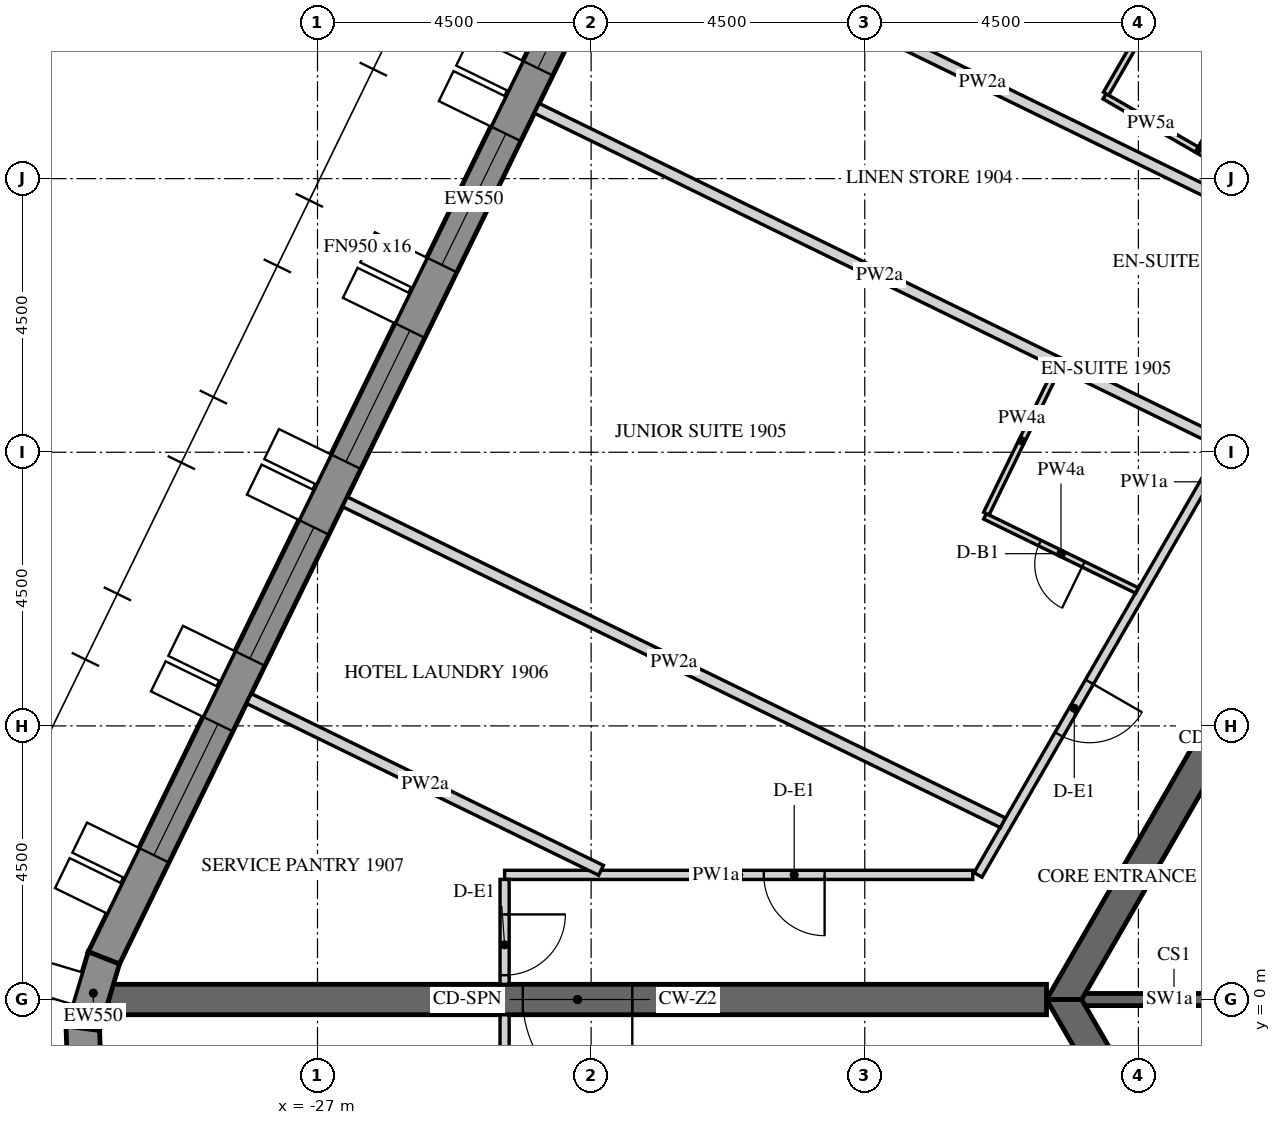
"""IFC4 building model, lengths in metres.
Left out: names, types, materials, properties, quantities, classifications, styles, units other than length and angle.
Written with IfcOpenShell. Run it as: python <this file> out.ifc"""

import sys

from ifc_helpers import new_model, si_unit, direction, frame, frame_2d, origin, place, context, subcontext, project, spatial, polyline, rectangle, outline, extrude, element, fill, save


model = new_model("IFC4")
c1 = context("Model", 3, precision=1e-05, world=origin(), true_north=direction((0.0, 1.0)))
c2 = subcontext(c1, "Body", "Model", "MODEL_VIEW")
j1 = project(units=[si_unit("LENGTHUNIT", "METRE"), si_unit("PLANEANGLEUNIT", "RADIAN")], contexts=[c1])
p1 = place(None, origin())
s1 = spatial("IfcSite", under=j1, at=p1, CompositionType="ELEMENT")
p2 = place(p1, origin())
s2 = spatial("IfcBuilding", under=s1, at=p2, CompositionType="ELEMENT")
p3 = place(p2, frame((0.0, 0.0, 238.5)))
s3 = spatial("IfcBuildingStorey", under=s2, at=p3, CompositionType="ELEMENT", Elevation=238.5)
p4 = place(p3, frame((-18.345, 25.633, -0.15), z_axis=(0.0, 0.0, 1.0), x_axis=(-0.43837181828, -0.898793718791, 0.0)))
e1 = element("IfcWall", 1, at=p4, inside=s3, PredefinedType="SOLIDWALL", context=c2, shape_type="SweptSolid", body=[
    extrude(outline(polyline([(-0.026, -0.275), (27.78, -0.275), (27.735, 0.275), (0.026, 0.275), (-0.026, -0.275)])), origin(), (0.0, 0.0, 1.0), 3.9),
])
p5 = place(p4, frame((1.879, 0.0, 1.05)))
e2 = element("IfcOpeningElement", 2, at=p5, cuts=e1, PredefinedType="OPENING", context=c2, shape_type="SweptSolid", body=[
    extrude(rectangle(XDim=2.4, YDim=2.4, at=frame_2d((1.2, 1.2))), frame((0.0, 0.285, 0.0), z_axis=(0.0, -1.0, 0.0), x_axis=(1.0, 0.0, 0.0)), (0.0, 0.0, 1.0), 0.57),
])
p6 = place(p4, frame((5.479, 0.0, 1.05)))
e3 = element("IfcOpeningElement", 3, at=p6, cuts=e1, PredefinedType="OPENING", context=c2, shape_type="SweptSolid", body=[
    extrude(rectangle(XDim=2.4, YDim=2.4, at=frame_2d((1.2, 1.2))), frame((0.0, 0.285, 0.0), z_axis=(0.0, -1.0, 0.0), x_axis=(1.0, 0.0, 0.0)), (0.0, 0.0, 1.0), 0.57),
])
p7 = place(p4, frame((9.079, 0.0, 1.05)))
e4 = element("IfcOpeningElement", 4, at=p7, cuts=e1, PredefinedType="OPENING", context=c2, shape_type="SweptSolid", body=[
    extrude(rectangle(XDim=2.4, YDim=2.4, at=frame_2d((1.2, 1.2))), frame((0.0, 0.285, 0.0), z_axis=(0.0, -1.0, 0.0), x_axis=(1.0, 0.0, 0.0)), (0.0, 0.0, 1.0), 0.57),
])
p8 = place(p4, frame((12.679, 0.0, 1.05)))
e5 = element("IfcOpeningElement", 5, at=p8, cuts=e1, PredefinedType="OPENING", context=c2, shape_type="SweptSolid", body=[
    extrude(rectangle(XDim=2.4, YDim=2.4, at=frame_2d((1.2, 1.2))), frame((0.0, 0.285, 0.0), z_axis=(0.0, -1.0, 0.0), x_axis=(1.0, 0.0, 0.0)), (0.0, 0.0, 1.0), 0.57),
])
p9 = place(p4, frame((16.279, 0.0, 1.05)))
e6 = element("IfcOpeningElement", 6, at=p9, cuts=e1, PredefinedType="OPENING", context=c2, shape_type="SweptSolid", body=[
    extrude(rectangle(XDim=2.4, YDim=2.4, at=frame_2d((1.2, 1.2))), frame((0.0, 0.285, 0.0), z_axis=(0.0, -1.0, 0.0), x_axis=(1.0, 0.0, 0.0)), (0.0, 0.0, 1.0), 0.57),
])
p10 = place(p4, frame((19.879, 0.0, 1.05)))
e7 = element("IfcOpeningElement", 7, at=p10, cuts=e1, PredefinedType="OPENING", context=c2, shape_type="SweptSolid", body=[
    extrude(rectangle(XDim=2.4, YDim=2.4, at=frame_2d((1.2, 1.2))), frame((0.0, 0.285, 0.0), z_axis=(0.0, -1.0, 0.0), x_axis=(1.0, 0.0, 0.0)), (0.0, 0.0, 1.0), 0.57),
])
p11 = place(p4, frame((23.479, 0.0, 1.05)))
e8 = element("IfcOpeningElement", 8, at=p11, cuts=e1, PredefinedType="OPENING", context=c2, shape_type="SweptSolid", body=[
    extrude(rectangle(XDim=2.4, YDim=2.4, at=frame_2d((1.2, 1.2))), frame((0.0, 0.285, 0.0), z_axis=(0.0, -1.0, 0.0), x_axis=(1.0, 0.0, 0.0)), (0.0, 0.0, 1.0), 0.57),
])
p12 = place(p3, frame((-30.513, 0.684, -0.15), z_axis=(0.0, 0.0, 1.0), x_axis=(-0.286736058109, -0.958009620505, 0.0)))
e9 = element("IfcWall", 9, at=p12, inside=s3, PredefinedType="SOLIDWALL", context=c2, shape_type="SweptSolid", body=[
    extrude(outline(polyline([(-0.022, -0.275), (1.253, -0.275), (1.163, 0.275), (0.022, 0.275), (-0.022, -0.275)])), origin(), (0.0, 0.0, 1.0), 3.9),
])
p13 = place(p3, frame((-30.86, -0.473, -0.15), z_axis=(0.0, 0.0, 1.0), x_axis=(0.03495638276, -0.999388838893, 0.0)))
e10 = element("IfcWall", 10, at=p13, inside=s3, PredefinedType="SOLIDWALL", context=c2, shape_type="SweptSolid", body=[
    extrude(outline(polyline([(-0.045, -0.275), (1.253, -0.275), (1.163, 0.275), (0.045, 0.275), (-0.045, -0.275)])), origin(), (0.0, 0.0, 1.0), 3.9),
])
p14 = place(p3, frame((-7.361, 12.75, -0.15), z_axis=(0.0, 0.0, 1.0), x_axis=(-0.50000571537, -0.866022103989, 0.0)))
e11 = element("IfcWall", 11, at=p14, inside=s3, PredefinedType="SHEAR", context=c2, shape_type="SweptSolid", body=[
    extrude(outline(polyline([(-0.144, -0.25), (14.867, -0.25), (14.578, 0.25), (0.144, 0.25), (-0.144, -0.25)])), origin(), (0.0, 0.0, 1.0), 3.9),
])
p15 = place(p14, frame((6.49, 0.0, 0.15)))
e12 = element("IfcOpeningElement", 12, at=p15, cuts=e11, PredefinedType="OPENING", context=c2, shape_type="SweptSolid", body=[
    extrude(rectangle(XDim=1.8, YDim=2.4, at=frame_2d((0.9, 1.2))), frame((0.0, 0.26, 0.0), z_axis=(0.0, -1.0, 0.0), x_axis=(1.0, 0.0, 0.0)), (0.0, 0.0, 1.0), 0.52),
])
p16 = place(p3, frame((-14.722, 0.0, -0.15), z_axis=(0.0, 0.0, 1.0), x_axis=(0.50000571537, -0.866022103989, 0.0)))
e13 = element("IfcWall", 13, at=p16, inside=s3, PredefinedType="SHEAR", context=c2, shape_type="SweptSolid", body=[
    extrude(outline(polyline([(-0.144, -0.25), (14.867, -0.25), (14.578, 0.25), (0.144, 0.25), (-0.144, -0.25)])), origin(), (0.0, 0.0, 1.0), 3.9),
])
p17 = place(p16, frame((6.432, 0.0, 0.15)))
e14 = element("IfcOpeningElement", 14, at=p17, cuts=e13, PredefinedType="OPENING", context=c2, shape_type="SweptSolid", body=[
    extrude(rectangle(XDim=1.8, YDim=2.4, at=frame_2d((0.9, 1.2))), frame((0.0, 0.26, 0.0), z_axis=(0.0, -1.0, 0.0), x_axis=(1.0, 0.0, 0.0)), (0.0, 0.0, 1.0), 0.52),
])
p18 = place(p3, frame((-15.011, 0.0, -0.15), z_axis=(0.0, 0.0, 1.0), x_axis=(-1.0, 0.0, 0.0)))
e15 = element("IfcWall", 15, at=p18, inside=s3, PredefinedType="SHEAR", context=c2, shape_type="SweptSolid", body=[
    extrude(rectangle(XDim=15.424, YDim=0.5, at=frame_2d((7.712, 0.0))), origin(), (0.0, 0.0, 1.0), 3.9),
])
p19 = place(p18, frame((6.812, 0.0, 0.15)))
e16 = element("IfcOpeningElement", 16, at=p19, cuts=e15, PredefinedType="OPENING", context=c2, shape_type="SweptSolid", body=[
    extrude(rectangle(XDim=1.8, YDim=2.4, at=frame_2d((0.9, 1.2))), frame((0.0, 0.26, 0.0), z_axis=(0.0, -1.0, 0.0), x_axis=(1.0, 0.0, 0.0)), (0.0, 0.0, 1.0), 0.52),
])
p20 = place(p3, frame((-11.547, 0.0, -0.15), z_axis=(0.0, 0.0, 1.0), x_axis=(-1.0, 0.0, 0.0)))
e17 = element("IfcWall", 17, at=p20, inside=s3, PredefinedType="SHEAR", context=c2, shape_type="SweptSolid", body=[
    extrude(rectangle(XDim=2.887, YDim=0.2, at=frame_2d((1.443, 0.0))), origin(), (0.0, 0.0, 1.0), 3.9),
])
p21 = place(p3, frame((-8.673, 14.978, 0.0), z_axis=(0.0, 0.0, 1.0), x_axis=(-0.50000700621, -0.86602135871, 0.0)))
e18 = element("IfcWall", 18, at=p21, inside=s3, PredefinedType="PARTITIONING", context=c2, shape_type="SweptSolid", body=[
    extrude(rectangle(XDim=14.928, YDim=0.15, at=frame_2d((7.464, 0.0))), origin(), (0.0, 0.0, 1.0), 2.838),
])
p22 = place(p21, frame((4.454, 0.0, 0.0)))
e19 = element("IfcOpeningElement", 19, at=p22, cuts=e18, PredefinedType="OPENING", context=c2, shape_type="SweptSolid", body=[
    extrude(rectangle(XDim=1.0, YDim=2.1, at=frame_2d((0.5, 1.05))), frame((0.0, 0.085, 0.0), z_axis=(0.0, -1.0, 0.0), x_axis=(1.0, 0.0, 0.0)), (0.0, 0.0, 1.0), 0.17),
])
p23 = place(p21, frame((11.264, 0.0, 0.0)))
e20 = element("IfcOpeningElement", 20, at=p23, cuts=e18, PredefinedType="OPENING", context=c2, shape_type="SweptSolid", body=[
    extrude(rectangle(XDim=1.0, YDim=2.1, at=frame_2d((0.5, 1.05))), frame((0.0, 0.085, 0.0), z_axis=(0.0, -1.0, 0.0), x_axis=(1.0, 0.0, 0.0)), (0.0, 0.0, 1.0), 0.17),
])
p24 = place(p3, frame((-16.224, 2.05, 0.0), z_axis=(0.0, 0.0, 1.0), x_axis=(-1.0, 0.0, 0.0)))
e21 = element("IfcWall", 21, at=p24, inside=s3, PredefinedType="PARTITIONING", context=c2, shape_type="SweptSolid", body=[
    extrude(rectangle(XDim=7.699, YDim=0.15, at=frame_2d((3.85, 0.0))), origin(), (0.0, 0.0, 1.0), 2.838),
])
p25 = place(p24, frame((2.437, 0.0, 0.0)))
e22 = element("IfcOpeningElement", 22, at=p25, cuts=e21, PredefinedType="OPENING", context=c2, shape_type="SweptSolid", body=[
    extrude(rectangle(XDim=1.0, YDim=2.1, at=frame_2d((0.5, 1.05))), frame((0.0, 0.085, 0.0), z_axis=(0.0, -1.0, 0.0), x_axis=(1.0, 0.0, 0.0)), (0.0, 0.0, 1.0), 0.17),
])
p26 = place(p3, frame((-23.923, 1.975, 0.0), z_axis=(0.0, 0.0, 1.0), x_axis=(0.0, -1.0, 0.0)))
e23 = element("IfcWall", 23, at=p26, inside=s3, PredefinedType="PARTITIONING", context=c2, shape_type="SweptSolid", body=[
    extrude(rectangle(XDim=1.725, YDim=0.15, at=frame_2d((0.863, 0.0))), origin(), (0.0, 0.0, 1.0), 2.838),
])
p27 = place(p26, frame((0.575, 0.0, 0.0)))
e24 = element("IfcOpeningElement", 24, at=p27, cuts=e23, PredefinedType="OPENING", context=c2, shape_type="SweptSolid", body=[
    extrude(rectangle(XDim=1.0, YDim=2.1, at=frame_2d((0.5, 1.05))), frame((0.0, 0.085, 0.0), z_axis=(0.0, -1.0, 0.0), x_axis=(1.0, 0.0, 0.0)), (0.0, 0.0, 1.0), 0.17),
])
p28 = place(p3, frame((-23.923, -0.25, 0.0), z_axis=(0.0, 0.0, 1.0), x_axis=(0.0, -1.0, 0.0)))
e25 = element("IfcWall", 25, at=p28, inside=s3, PredefinedType="PARTITIONING", context=c2, shape_type="SweptSolid", body=[
    extrude(rectangle(XDim=1.8, YDim=0.15, at=frame_2d((0.9, 0.0))), origin(), (0.0, 0.0, 1.0), 2.838),
])
p29 = place(p3, frame((-10.138, 12.591, 0.0), z_axis=(0.0, 0.0, 1.0), x_axis=(-0.866051307416, 0.49995513091, 0.0)))
e26 = element("IfcWall", 26, at=p29, inside=s3, PredefinedType="PARTITIONING", context=c2, shape_type="SweptSolid", body=[
    extrude(rectangle(XDim=2.725, YDim=0.1, at=frame_2d((1.362, 0.0))), origin(), (0.0, 0.0, 1.0), 2.838),
])
p30 = place(p3, frame((-12.541, 13.978, 0.0), z_axis=(0.0, 0.0, 1.0), x_axis=(-0.866036909293, 0.499980071345, 0.0)))
e27 = element("IfcWall", 27, at=p30, inside=s3, PredefinedType="PARTITIONING", context=c2, shape_type="SweptSolid", body=[
    extrude(rectangle(XDim=1.75, YDim=0.1, at=frame_2d((0.875, 0.0))), origin(), (0.0, 0.0, 1.0), 2.838),
])
p31 = place(p3, frame((-14.031, 14.896, 0.0), z_axis=(0.0, 0.0, 1.0), x_axis=(0.499996545922, 0.866027397988, 0.0)))
e28 = element("IfcWall", 28, at=p31, inside=s3, PredefinedType="PARTITIONING", context=c2, shape_type="SweptSolid", body=[
    extrude(rectangle(XDim=2.75, YDim=0.1, at=frame_2d((1.375, 0.0))), origin(), (0.0, 0.0, 1.0), 2.838),
])
p32 = place(p3, frame((-21.815, 17.892, 0.0), z_axis=(0.0, 0.0, 1.0), x_axis=(0.898799253997, -0.438360469265, 0.0)))
e29 = element("IfcWall", 29, at=p32, inside=s3, PredefinedType="PARTITIONING", context=c2, shape_type="SweptSolid", body=[
    extrude(rectangle(XDim=12.794, YDim=0.18, at=frame_2d((6.397, 0.0))), origin(), (0.0, 0.0, 1.0), 2.838),
])
p33 = place(p3, frame((-11.123, 16.335, 0.0), z_axis=(0.0, 0.0, 1.0), x_axis=(-0.499980770555, -0.866036505625, 0.0)))
e30 = element("IfcWall", 30, at=p33, inside=s3, PredefinedType="PARTITIONING", context=c2, shape_type="SweptSolid", body=[
    extrude(rectangle(XDim=2.7, YDim=0.1, at=frame_2d((1.35, 0.0))), origin(), (0.0, 0.0, 1.0), 2.838),
])
p34 = place(p3, frame((-23.393, 14.656, 0.0), z_axis=(0.0, 0.0, 1.0), x_axis=(0.898790706576, -0.43837799417, 0.0)))
e31 = element("IfcWall", 31, at=p34, inside=s3, PredefinedType="PARTITIONING", context=c2, shape_type="SweptSolid", body=[
    extrude(rectangle(XDim=12.542, YDim=0.18, at=frame_2d((6.271, 0.0))), origin(), (0.0, 0.0, 1.0), 2.838),
])
p35 = place(p3, frame((-13.523, 6.727, 0.0), z_axis=(0.0, 0.0, 1.0), x_axis=(-0.89880809785, 0.438342335668, 0.0)))
e32 = element("IfcWall", 32, at=p35, inside=s3, PredefinedType="PARTITIONING", context=c2, shape_type="SweptSolid", body=[
    extrude(rectangle(XDim=2.781, YDim=0.1, at=frame_2d((1.391, 0.0))), origin(), (0.0, 0.0, 1.0), 2.838),
])
p36 = place(p35, frame((0.981, 0.0, 0.0)))
e33 = element("IfcOpeningElement", 33, at=p36, cuts=e32, PredefinedType="OPENING", context=c2, shape_type="SweptSolid", body=[
    extrude(rectangle(XDim=0.8, YDim=2.1, at=frame_2d((0.4, 1.05))), frame((0.0, 0.06, 0.0), z_axis=(0.0, -1.0, 0.0), x_axis=(1.0, 0.0, 0.0)), (0.0, 0.0, 1.0), 0.12),
])
p37 = place(p3, frame((-16.001, 7.991, 0.0), z_axis=(0.0, 0.0, 1.0), x_axis=(0.438344066549, 0.89880725371, 0.0)))
e34 = element("IfcWall", 34, at=p37, inside=s3, PredefinedType="PARTITIONING", context=c2, shape_type="SweptSolid", body=[
    extrude(rectangle(XDim=2.66, YDim=0.1, at=frame_2d((1.33, 0.0))), origin(), (0.0, 0.0, 1.0), 2.838),
])
p38 = place(p3, frame((-26.549, 8.185, 0.0), z_axis=(0.0, 0.0, 1.0), x_axis=(0.8987965099, -0.438366095623, 0.0)))
e35 = element("IfcWall", 35, at=p38, inside=s3, PredefinedType="PARTITIONING", context=c2, shape_type="SweptSolid", body=[
    extrude(rectangle(XDim=12.039, YDim=0.18, at=frame_2d((6.019, 0.0))), origin(), (0.0, 0.0, 1.0), 2.838),
])
p39 = place(p3, frame((-28.127, 4.949, 0.0), z_axis=(0.0, 0.0, 1.0), x_axis=(0.898795032868, -0.438369124017, 0.0)))
e36 = element("IfcWall", 36, at=p39, inside=s3, PredefinedType="PARTITIONING", context=c2, shape_type="SweptSolid", body=[
    extrude(rectangle(XDim=6.442, YDim=0.18, at=frame_2d((3.221, 0.0))), origin(), (0.0, 0.0, 1.0), 2.838),
])
p40 = place(p7, frame((0.0, 0.205, 0.0)))
e37 = element("IfcWindow", 37, at=p40, inside=s3, PartitioningType="DOUBLE_PANEL_VERTICAL", PredefinedType="WINDOW", context=c2, shape_type="SweptSolid", body=[
    extrude(rectangle(XDim=2.4, YDim=2.4, at=frame_2d((1.2, 1.2))), frame((0.0, 0.03, 0.0), z_axis=(0.0, -1.0, 0.0), x_axis=(1.0, 0.0, 0.0)), (0.0, 0.0, 1.0), 0.06),
])
fill(e4, e37)
p41 = place(p8, frame((0.0, 0.205, 0.0)))
e38 = element("IfcWindow", 38, at=p41, inside=s3, PartitioningType="DOUBLE_PANEL_VERTICAL", PredefinedType="WINDOW", context=c2, shape_type="SweptSolid", body=[
    extrude(rectangle(XDim=2.4, YDim=2.4, at=frame_2d((1.2, 1.2))), frame((0.0, 0.03, 0.0), z_axis=(0.0, -1.0, 0.0), x_axis=(1.0, 0.0, 0.0)), (0.0, 0.0, 1.0), 0.06),
])
fill(e5, e38)
p42 = place(p9, frame((0.0, 0.205, 0.0)))
e39 = element("IfcWindow", 39, at=p42, inside=s3, PartitioningType="DOUBLE_PANEL_VERTICAL", PredefinedType="WINDOW", context=c2, shape_type="SweptSolid", body=[
    extrude(rectangle(XDim=2.4, YDim=2.4, at=frame_2d((1.2, 1.2))), frame((0.0, 0.03, 0.0), z_axis=(0.0, -1.0, 0.0), x_axis=(1.0, 0.0, 0.0)), (0.0, 0.0, 1.0), 0.06),
])
fill(e6, e39)
p43 = place(p10, frame((0.0, 0.205, 0.0)))
e40 = element("IfcWindow", 40, at=p43, inside=s3, PartitioningType="DOUBLE_PANEL_VERTICAL", PredefinedType="WINDOW", context=c2, shape_type="SweptSolid", body=[
    extrude(rectangle(XDim=2.4, YDim=2.4, at=frame_2d((1.2, 1.2))), frame((0.0, 0.03, 0.0), z_axis=(0.0, -1.0, 0.0), x_axis=(1.0, 0.0, 0.0)), (0.0, 0.0, 1.0), 0.06),
])
fill(e7, e40)
p44 = place(p11, frame((0.0, 0.205, 0.0)))
e41 = element("IfcWindow", 41, at=p44, inside=s3, PartitioningType="DOUBLE_PANEL_VERTICAL", PredefinedType="WINDOW", context=c2, shape_type="SweptSolid", body=[
    extrude(rectangle(XDim=2.4, YDim=2.4, at=frame_2d((1.2, 1.2))), frame((0.0, 0.03, 0.0), z_axis=(0.0, -1.0, 0.0), x_axis=(1.0, 0.0, 0.0)), (0.0, 0.0, 1.0), 0.06),
])
fill(e8, e41)
p45 = place(p19, origin())
e42 = element("IfcDoor", 42, at=p45, inside=s3, OperationType="DOUBLE_DOOR_SINGLE_SWING", PredefinedType="DOOR", context=c2, shape_type="SweptSolid", body=[
    extrude(rectangle(XDim=1.8, YDim=2.4, at=frame_2d((0.9, 1.2))), frame((0.0, 0.025, 0.0), z_axis=(0.0, -1.0, 0.0), x_axis=(1.0, 0.0, 0.0)), (0.0, 0.0, 1.0), 0.05),
])
fill(e16, e42)
p46 = place(p23, origin())
e43 = element("IfcDoor", 43, at=p46, inside=s3, OperationType="SINGLE_SWING_LEFT", PredefinedType="DOOR", context=c2, shape_type="SweptSolid", body=[
    extrude(rectangle(XDim=1.0, YDim=2.1, at=frame_2d((0.5, 1.05))), frame((0.0, 0.025, 0.0), z_axis=(0.0, -1.0, 0.0), x_axis=(1.0, 0.0, 0.0)), (0.0, 0.0, 1.0), 0.05),
])
fill(e20, e43)
p47 = place(p36, origin())
e44 = element("IfcDoor", 44, at=p47, inside=s3, OperationType="SINGLE_SWING_RIGHT", PredefinedType="DOOR", context=c2, shape_type="SweptSolid", body=[
    extrude(rectangle(XDim=0.8, YDim=2.1, at=frame_2d((0.4, 1.05))), frame((0.0, 0.025, 0.0), z_axis=(0.0, -1.0, 0.0), x_axis=(1.0, 0.0, 0.0)), (0.0, 0.0, 1.0), 0.05),
])
fill(e33, e44)
p48 = place(p25, origin())
e45 = element("IfcDoor", 45, at=p48, inside=s3, OperationType="SINGLE_SWING_RIGHT", PredefinedType="DOOR", context=c2, shape_type="SweptSolid", body=[
    extrude(rectangle(XDim=1.0, YDim=2.1, at=frame_2d((0.5, 1.05))), frame((0.0, 0.025, 0.0), z_axis=(0.0, -1.0, 0.0), x_axis=(1.0, 0.0, 0.0)), (0.0, 0.0, 1.0), 0.05),
])
fill(e22, e45)
p49 = place(p27, origin())
e46 = element("IfcDoor", 46, at=p49, inside=s3, OperationType="SINGLE_SWING_LEFT", PredefinedType="DOOR", context=c2, shape_type="SweptSolid", body=[
    extrude(rectangle(XDim=1.0, YDim=2.1, at=frame_2d((0.5, 1.05))), frame((0.0, 0.025, 0.0), z_axis=(0.0, -1.0, 0.0), x_axis=(1.0, 0.0, 0.0)), (0.0, 0.0, 1.0), 0.05),
])
fill(e24, e46)
save(model, sys.argv[1])
